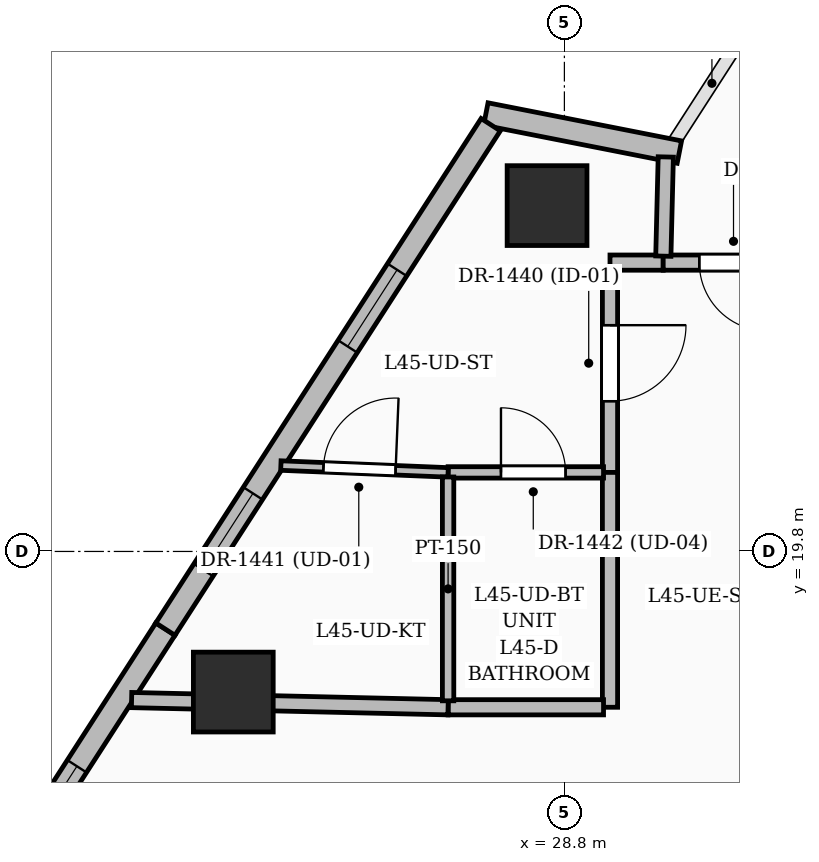
"""IFC4 building model, lengths in metres.
Left out: names, types, materials, properties, quantities, classifications, styles, units other than length and angle.
Written with IfcOpenShell. Run it as: python <this file> out.ifc"""

import sys

from ifc_helpers import new_model, si_unit, direction, frame, frame_2d, origin, origin_2d, place, context, subcontext, project, spatial, rectangle, extrude, element, fill, save


model = new_model("IFC4")
c1 = context("Model", 3, precision=1e-05, world=origin(), true_north=direction((0.0, 1.0)))
c2 = subcontext(c1, "Body", "Model", "MODEL_VIEW")
j1 = project(units=[si_unit("LENGTHUNIT", "METRE"), si_unit("PLANEANGLEUNIT", "RADIAN")], contexts=[c1])
p1 = place(None, origin())
s1 = spatial("IfcSite", under=j1, at=p1, CompositionType="ELEMENT")
p2 = place(p1, origin())
s2 = spatial("IfcBuilding", under=s1, at=p2, CompositionType="ELEMENT")
p3 = place(p2, frame((0.0, 0.0, 175.2)))
s3 = spatial("IfcBuildingStorey", under=s2, at=p3, CompositionType="ELEMENT", Elevation=175.2)
for number, where, z_axis, x_axis in (
    (1, (28.572, 24.35, 0.0), (0.0, 0.0, 1.0), (1.0, 0.0, 0.0)),
    (2, (24.444, 17.95, 0.0), (0.0, 0.0, 1.0), (1.0, 0.0, 0.0)),
):
    element("IfcColumn", number, at=place(p3, frame(where, z_axis=z_axis, x_axis=x_axis)), inside=s3, PredefinedType="COLUMN", context=c2, shape_type="SweptSolid", body=[
        extrude(rectangle(XDim=1.05, YDim=1.05, at=origin_2d()), origin(), (0.0, 0.0, 1.0), 3.6),
    ])
p4 = place(p3, frame((27.767, 25.555, 0.0), z_axis=(0.0, 0.0, 1.0), x_axis=(0.981183938234, -0.193075320412, 0.0)))
e3 = element("IfcWall", 3, at=p4, inside=s3, PredefinedType="SOLIDWALL", context=c2, shape_type="SweptSolid", body=[
    extrude(rectangle(XDim=2.595, YDim=0.3, at=frame_2d((1.297, 0.0))), origin(), (0.0, 0.0, 1.0), 2.575),
])
p5 = place(p3, frame((19.121, 11.911, 0.0), z_axis=(0.0, 0.0, 1.0), x_axis=(0.542005736819, 0.840374786185, 0.0)))
e4 = element("IfcWall", 4, at=p5, inside=s3, PredefinedType="SOLIDWALL", context=c2, shape_type="SweptSolid", body=[
    extrude(rectangle(XDim=8.172, YDim=0.3, at=frame_2d((4.086, 0.0))), origin(), (0.0, 0.0, 1.0), 3.35),
])
p6 = place(p5, frame((4.525, 0.0, 0.6)))
e5 = element("IfcOpeningElement", 5, at=p6, cuts=e4, PredefinedType="OPENING", context=c2, shape_type="SweptSolid", body=[
    extrude(rectangle(XDim=1.5, YDim=2.1, at=frame_2d((0.75, 1.05))), frame((0.0, 0.16, 0.0), z_axis=(0.0, -1.0, 0.0), x_axis=(1.0, 0.0, 0.0)), (0.0, 0.0, 1.0), 0.32),
])
p7 = place(p5, frame((1.025, 0.0, 0.6)))
e6 = element("IfcOpeningElement", 6, at=p7, cuts=e4, PredefinedType="OPENING", context=c2, shape_type="SweptSolid", body=[
    extrude(rectangle(XDim=1.5, YDim=2.1, at=frame_2d((0.75, 1.05))), frame((0.0, 0.16, 0.0), z_axis=(0.0, -1.0, 0.0), x_axis=(1.0, 0.0, 0.0)), (0.0, 0.0, 1.0), 0.32),
])
p8 = place(p3, frame((23.551, 18.778, 0.0), z_axis=(0.0, 0.0, 1.0), x_axis=(0.542022645608, 0.840363880499, 0.0)))
e7 = element("IfcWall", 7, at=p8, inside=s3, PredefinedType="SOLIDWALL", context=c2, shape_type="SweptSolid", body=[
    extrude(rectangle(XDim=7.897, YDim=0.3, at=frame_2d((3.948, 0.0))), origin(), (0.0, 0.0, 1.0), 3.35),
])
p9 = place(p8, frame((4.425, 0.0, 0.8)))
e8 = element("IfcOpeningElement", 8, at=p9, cuts=e7, PredefinedType="OPENING", context=c2, shape_type="SweptSolid", body=[
    extrude(rectangle(XDim=1.2, YDim=1.8, at=frame_2d((0.6, 0.9))), frame((0.0, 0.16, 0.0), z_axis=(0.0, -1.0, 0.0), x_axis=(1.0, 0.0, 0.0)), (0.0, 0.0, 1.0), 0.32),
])
p10 = place(p8, frame((0.925, 0.0, 0.8)))
e9 = element("IfcOpeningElement", 9, at=p10, cuts=e7, PredefinedType="OPENING", context=c2, shape_type="SweptSolid", body=[
    extrude(rectangle(XDim=1.2, YDim=1.8, at=frame_2d((0.6, 0.9))), frame((0.0, 0.16, 0.0), z_axis=(0.0, -1.0, 0.0), x_axis=(1.0, 0.0, 0.0)), (0.0, 0.0, 1.0), 0.32),
])
p11 = place(p3, frame((30.1, 23.6, 0.0), z_axis=(0.0, 0.0, 1.0), x_axis=(-1.0, 0.0, 0.0)))
e10 = element("IfcWall", 10, at=p11, inside=s3, PredefinedType="PARTITIONING", context=c2, shape_type="SweptSolid", body=[
    extrude(rectangle(XDim=0.7, YDim=0.2, at=frame_2d((0.35, 0.0))), origin(), (0.0, 0.0, 1.0), 2.464),
])
p12 = place(p3, frame((29.4, 23.515, 0.0), z_axis=(0.0, 0.0, 1.0), x_axis=(0.0, -1.0, 0.0)))
e11 = element("IfcWall", 11, at=p12, inside=s3, PredefinedType="PARTITIONING", context=c2, shape_type="SweptSolid", body=[
    extrude(rectangle(XDim=2.675, YDim=0.2, at=frame_2d((1.337, 0.0))), origin(), (0.0, 0.0, 1.0), 2.464),
])
p13 = place(p12, frame((0.738, 0.0, 0.0)))
e12 = element("IfcOpeningElement", 12, at=p13, cuts=e11, PredefinedType="OPENING", context=c2, shape_type="SweptSolid", body=[
    extrude(rectangle(XDim=1.0, YDim=2.2, at=frame_2d((0.5, 1.1))), frame((0.0, 0.11, 0.0), z_axis=(0.0, -1.0, 0.0), x_axis=(1.0, 0.0, 0.0)), (0.0, 0.0, 1.0), 0.22),
])
p14 = place(p3, frame((29.4, 20.84, 0.0), z_axis=(0.0, 0.0, 1.0), x_axis=(0.0, -1.0, 0.0)))
e13 = element("IfcWall", 13, at=p14, inside=s3, PredefinedType="PARTITIONING", context=c2, shape_type="SweptSolid", body=[
    extrude(rectangle(XDim=3.09, YDim=0.2, at=frame_2d((1.545, 0.0))), origin(), (0.0, 0.0, 1.0), 2.86),
])
p15 = place(p3, frame((29.315, 17.75, 0.0), z_axis=(0.0, 0.0, 1.0), x_axis=(-1.0, 0.0, 0.0)))
e14 = element("IfcWall", 14, at=p15, inside=s3, PredefinedType="PARTITIONING", context=c2, shape_type="SweptSolid", body=[
    extrude(rectangle(XDim=2.045, YDim=0.2, at=frame_2d((1.022, 0.0))), origin(), (0.0, 0.0, 1.0), 2.86),
])
p16 = place(p3, frame((27.27, 17.75, 0.0), z_axis=(0.0, 0.0, 1.0), x_axis=(-0.999740016706, 0.022801293768, 0.0)))
e15 = element("IfcWall", 15, at=p16, inside=s3, PredefinedType="PARTITIONING", context=c2, shape_type="SweptSolid", body=[
    extrude(rectangle(XDim=4.165, YDim=0.2, at=frame_2d((2.083, 0.0))), origin(), (0.0, 0.0, 1.0), 2.86),
])
p17 = place(p3, frame((31.865, 23.6, 0.0), z_axis=(0.0, 0.0, 1.0), x_axis=(-1.0, 0.0, 0.0)))
e16 = element("IfcWall", 16, at=p17, inside=s3, PredefinedType="PARTITIONING", context=c2, shape_type="SweptSolid", body=[
    extrude(rectangle(XDim=1.765, YDim=0.2, at=frame_2d((0.882, 0.0))), origin(), (0.0, 0.0, 1.0), 3.35),
])
p18 = place(p17, frame((0.39, 0.0, 0.0)))
e17 = element("IfcOpeningElement", 17, at=p18, cuts=e16, PredefinedType="OPENING", context=c2, shape_type="SweptSolid", body=[
    extrude(rectangle(XDim=0.9, YDim=2.1, at=frame_2d((0.45, 1.05))), frame((0.0, 0.11, 0.0), z_axis=(0.0, -1.0, 0.0), x_axis=(1.0, 0.0, 0.0)), (0.0, 0.0, 1.0), 0.22),
])
p19 = place(p3, frame((27.27, 20.84, 0.0), z_axis=(0.0, 0.0, 1.0), x_axis=(1.0, 0.0, 0.0)))
e18 = element("IfcWall", 18, at=p19, inside=s3, PredefinedType="PARTITIONING", context=c2, shape_type="SweptSolid", body=[
    extrude(rectangle(XDim=2.045, YDim=0.15, at=frame_2d((1.022, 0.0))), origin(), (0.0, 0.0, 1.0), 3.35),
])
p20 = place(p19, frame((0.696, 0.0, 0.0)))
e19 = element("IfcOpeningElement", 19, at=p20, cuts=e18, PredefinedType="OPENING", context=c2, shape_type="SweptSolid", body=[
    extrude(rectangle(XDim=0.85, YDim=2.1, at=frame_2d((0.425, 1.05))), frame((0.0, 0.085, 0.0), z_axis=(0.0, -1.0, 0.0), x_axis=(1.0, 0.0, 0.0)), (0.0, 0.0, 1.0), 0.17),
])
p21 = place(p3, frame((25.07, 20.93, 0.0), z_axis=(0.0, 0.0, 1.0), x_axis=(0.999167130741, -0.04080496106, 0.0)))
e20 = element("IfcWall", 20, at=p21, inside=s3, PredefinedType="PARTITIONING", context=c2, shape_type="SweptSolid", body=[
    extrude(rectangle(XDim=2.202, YDim=0.125, at=frame_2d((1.101, 0.0))), origin(), (0.0, 0.0, 1.0), 2.57),
])
p22 = place(p21, frame((0.561, 0.0, 0.0)))
e21 = element("IfcOpeningElement", 21, at=p22, cuts=e20, PredefinedType="OPENING", context=c2, shape_type="SweptSolid", body=[
    extrude(rectangle(XDim=0.95, YDim=2.2, at=frame_2d((0.475, 1.1))), frame((0.0, 0.072, 0.0), z_axis=(0.0, -1.0, 0.0), x_axis=(1.0, 0.0, 0.0)), (0.0, 0.0, 1.0), 0.145),
])
p23 = place(p3, frame((30.102, 23.685, 0.0), z_axis=(0.0, 0.0, 1.0), x_axis=(0.024688450061, 0.999695193763, 0.0)))
e22 = element("IfcWall", 22, at=p23, inside=s3, PredefinedType="PARTITIONING", context=c2, shape_type="SweptSolid", body=[
    extrude(rectangle(XDim=1.305, YDim=0.2, at=frame_2d((0.653, 0.0))), origin(), (0.0, 0.0, 1.0), 3.35),
])
p24 = place(p3, frame((27.27, 20.78, 0.0), z_axis=(0.0, 0.0, 1.0), x_axis=(0.0, -1.0, 0.0)))
e23 = element("IfcWall", 23, at=p24, inside=s3, PredefinedType="PARTITIONING", context=c2, shape_type="SweptSolid", body=[
    extrude(rectangle(XDim=2.945, YDim=0.15, at=frame_2d((1.473, 0.0))), origin(), (0.0, 0.0, 1.0), 2.86),
])
p25 = place(p6, origin())
e24 = element("IfcWindow", 24, at=p25, inside=s3, PartitioningType="SINGLE_PANEL", PredefinedType="WINDOW", context=c2, shape_type="SweptSolid", body=[
    extrude(rectangle(XDim=1.5, YDim=2.1, at=frame_2d((0.75, 1.05))), frame((0.0, 0.03, 0.0), z_axis=(0.0, -1.0, 0.0), x_axis=(1.0, 0.0, 0.0)), (0.0, 0.0, 1.0), 0.06),
])
fill(e5, e24)
p26 = place(p9, origin())
e25 = element("IfcWindow", 25, at=p26, inside=s3, PartitioningType="SINGLE_PANEL", PredefinedType="WINDOW", context=c2, shape_type="SweptSolid", body=[
    extrude(rectangle(XDim=1.2, YDim=1.8, at=frame_2d((0.6, 0.9))), frame((0.0, 0.03, 0.0), z_axis=(0.0, -1.0, 0.0), x_axis=(1.0, 0.0, 0.0)), (0.0, 0.0, 1.0), 0.06),
])
fill(e8, e25)
p27 = place(p10, origin())
e26 = element("IfcWindow", 26, at=p27, inside=s3, PartitioningType="SINGLE_PANEL", PredefinedType="WINDOW", context=c2, shape_type="SweptSolid", body=[
    extrude(rectangle(XDim=1.2, YDim=1.8, at=frame_2d((0.6, 0.9))), frame((0.0, 0.03, 0.0), z_axis=(0.0, -1.0, 0.0), x_axis=(1.0, 0.0, 0.0)), (0.0, 0.0, 1.0), 0.06),
])
fill(e9, e26)
p28 = place(p18, origin())
e27 = element("IfcDoor", 27, at=p28, inside=s3, OperationType="SINGLE_SWING_LEFT", PredefinedType="DOOR", context=c2, shape_type="SweptSolid", body=[
    extrude(rectangle(XDim=0.9, YDim=2.1, at=frame_2d((0.45, 1.05))), frame((0.0, 0.025, 0.0), z_axis=(0.0, -1.0, 0.0), x_axis=(1.0, 0.0, 0.0)), (0.0, 0.0, 1.0), 0.05),
])
fill(e17, e27)
p29 = place(p13, origin())
e28 = element("IfcDoor", 28, at=p29, inside=s3, OperationType="SINGLE_SWING_LEFT", PredefinedType="DOOR", context=c2, shape_type="SweptSolid", body=[
    extrude(rectangle(XDim=1.0, YDim=2.2, at=frame_2d((0.5, 1.1))), frame((0.0, 0.025, 0.0), z_axis=(0.0, -1.0, 0.0), x_axis=(1.0, 0.0, 0.0)), (0.0, 0.0, 1.0), 0.05),
])
fill(e12, e28)
p30 = place(p22, origin())
e29 = element("IfcDoor", 29, at=p30, inside=s3, OperationType="SINGLE_SWING_RIGHT", PredefinedType="DOOR", context=c2, shape_type="SweptSolid", body=[
    extrude(rectangle(XDim=0.95, YDim=2.2, at=frame_2d((0.475, 1.1))), frame((0.0, 0.025, 0.0), z_axis=(0.0, -1.0, 0.0), x_axis=(1.0, 0.0, 0.0)), (0.0, 0.0, 1.0), 0.05),
])
fill(e21, e29)
p31 = place(p20, origin())
e30 = element("IfcDoor", 30, at=p31, inside=s3, OperationType="SINGLE_SWING_LEFT", PredefinedType="DOOR", context=c2, shape_type="SweptSolid", body=[
    extrude(rectangle(XDim=0.85, YDim=2.1, at=frame_2d((0.425, 1.05))), frame((0.0, 0.025, 0.0), z_axis=(0.0, -1.0, 0.0), x_axis=(1.0, 0.0, 0.0)), (0.0, 0.0, 1.0), 0.05),
])
fill(e19, e30)
save(model, sys.argv[1])
